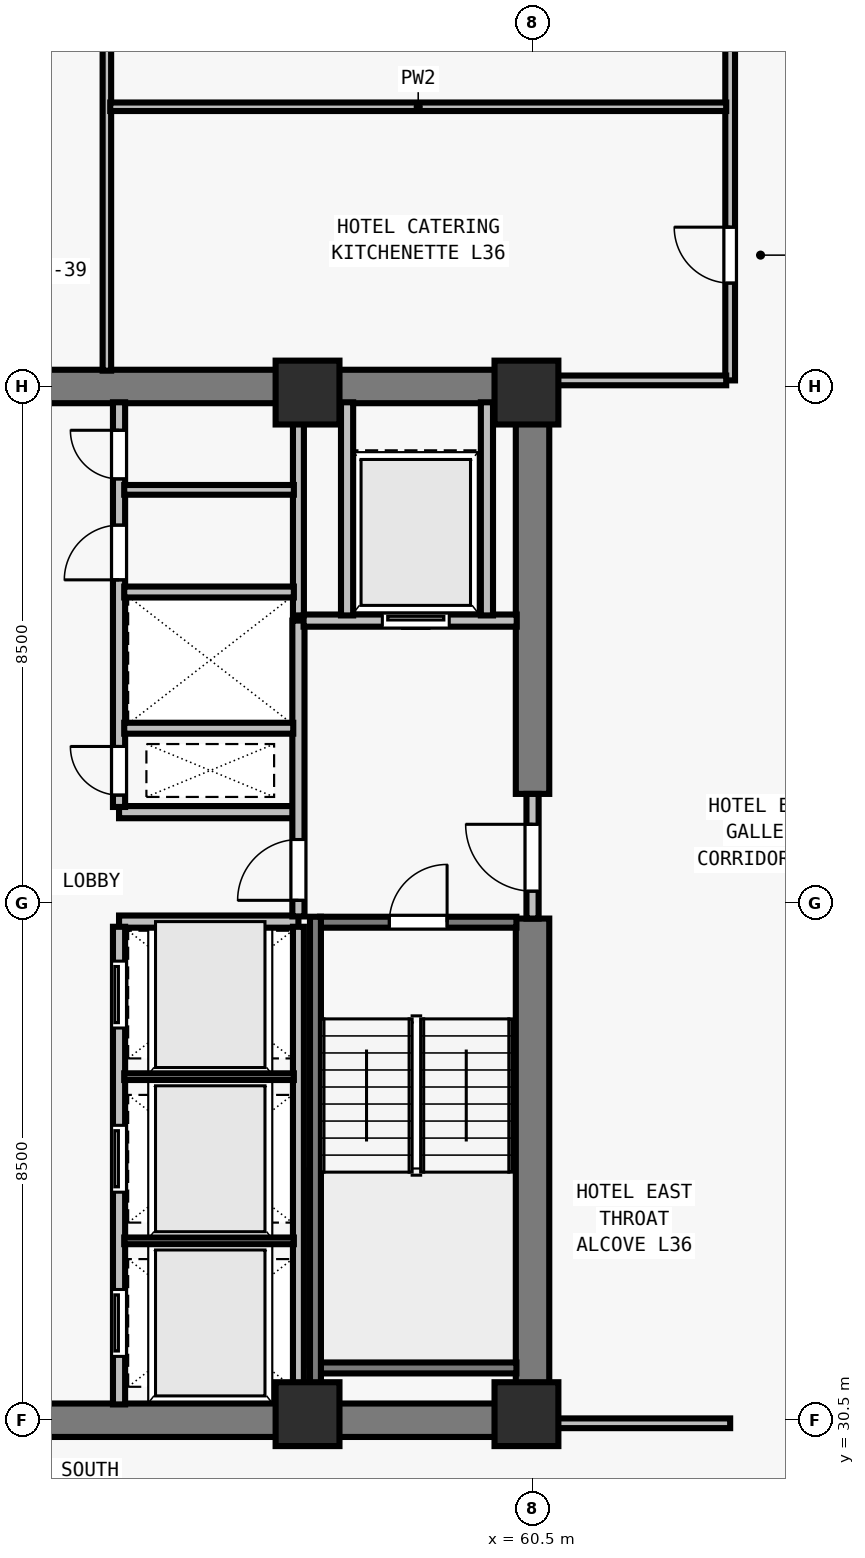
"""IFC4 building model, lengths in metres.
Left out: names, types, materials, properties, quantities, classifications, styles, units other than length and angle.
Written with IfcOpenShell. Run it as: python <this file> out.ifc"""

import sys

from ifc_helpers import new_model, si_unit, direction, frame, frame_2d, origin, origin_2d, place, context, subcontext, project, spatial, rectangle, extrude, element, fill, save


model = new_model("IFC4")
c1 = context("Model", 3, precision=1e-05, world=origin(), true_north=direction((0.0, 1.0)))
c2 = subcontext(c1, "Body", "Model", "MODEL_VIEW")
j1 = project(units=[si_unit("LENGTHUNIT", "METRE"), si_unit("PLANEANGLEUNIT", "RADIAN")], contexts=[c1])
p1 = place(None, origin())
s1 = spatial("IfcSite", under=j1, at=p1, CompositionType="ELEMENT")
p2 = place(p1, origin())
s2 = spatial("IfcBuilding", under=s1, at=p2, CompositionType="ELEMENT")
p3 = place(p2, frame((0.0, 0.0, 134.0)))
s3 = spatial("IfcBuildingStorey", under=s2, at=p3, CompositionType="ELEMENT", Elevation=134.0)
for number, where, z_axis, x_axis in (
    (1, (56.8, 30.6, 0.0), (0.0, 0.0, 1.0), (1.0, 0.0, 0.0)),
    (2, (60.4, 30.6, 0.0), (0.0, 0.0, 1.0), (1.0, 0.0, 0.0)),
    (3, (56.8, 47.4, 0.0), (0.0, 0.0, 1.0), (1.0, 0.0, 0.0)),
    (4, (60.4, 47.4, 0.0), (0.0, 0.0, 1.0), (1.0, 0.0, 0.0)),
):
    element("IfcColumn", number, at=place(p3, frame(where, z_axis=z_axis, x_axis=x_axis)), inside=s3, PredefinedType="COLUMN", context=c2, shape_type="SweptSolid", body=[
        extrude(rectangle(XDim=1.05, YDim=1.05, at=origin_2d()), origin(), (0.0, 0.0, 1.0), 3.5),
    ])
for number, where, z_axis, x_axis in (
    (5, (43.225, 30.5, 0.0), (0.0, 0.0, 1.0), (1.0, 0.0, 0.0)),
    (6, (43.225, 47.5, 0.0), (0.0, 0.0, 1.0), (1.0, 0.0, 0.0)),
):
    element("IfcWall", number, at=place(p3, frame(where, z_axis=z_axis, x_axis=x_axis)), inside=s3, PredefinedType="SHEAR", context=c2, shape_type="SweptSolid", body=[
        extrude(rectangle(XDim=17.55, YDim=0.55, at=frame_2d((8.775, 0.0))), origin(), (0.0, 0.0, 1.0), 3.28),
    ])
p4 = place(p3, frame((60.5, 30.765, 0.0), z_axis=(0.0, 0.0, 1.0), x_axis=(0.0, 1.0, 0.0)))
e7 = element("IfcWall", 7, at=p4, inside=s3, PredefinedType="SHEAR", context=c2, shape_type="SweptSolid", body=[
    extrude(rectangle(XDim=7.985, YDim=0.55, at=frame_2d((3.993, 0.0))), origin(), (0.0, 0.0, 1.0), 3.28),
])
p5 = place(p3, frame((60.5, 40.8, 0.0), z_axis=(0.0, 0.0, 1.0), x_axis=(0.0, 1.0, 0.0)))
e8 = element("IfcWall", 8, at=p5, inside=s3, PredefinedType="SHEAR", context=c2, shape_type="SweptSolid", body=[
    extrude(rectangle(XDim=6.435, YDim=0.55, at=frame_2d((3.218, 0.0))), origin(), (0.0, 0.0, 1.0), 3.28),
])
for number, where, z_axis, x_axis in (
    (9, (53.7, 38.7, 0.0), (0.0, 0.0, 1.0), (1.0, 0.0, 0.0)),
    (10, (53.7, 40.5, 0.0), (0.0, 0.0, 1.0), (1.0, 0.0, 0.0)),
):
    element("IfcWall", number, at=place(p3, frame(where, z_axis=z_axis, x_axis=x_axis)), inside=s3, PredefinedType="SOLIDWALL", context=c2, shape_type="SweptSolid", body=[
        extrude(rectangle(XDim=2.95, YDim=0.2, at=frame_2d((1.475, 0.0))), origin(), (0.0, 0.0, 1.0), 3.28),
    ])
p6 = place(p3, frame((53.7, 30.76, 0.0), z_axis=(0.0, 0.0, 1.0), x_axis=(0.0, 1.0, 0.0)))
e11 = element("IfcWall", 11, at=p6, inside=s3, PredefinedType="SOLIDWALL", context=c2, shape_type="SweptSolid", body=[
    extrude(rectangle(XDim=7.855, YDim=0.2, at=frame_2d((3.927, 0.0))), origin(), (0.0, 0.0, 1.0), 3.28),
])
p7 = place(p6, frame((0.79, 0.0, 0.0)))
e12 = element("IfcOpeningElement", 12, at=p7, cuts=e11, PredefinedType="OPENING", context=c2, shape_type="SweptSolid", body=[
    extrude(rectangle(XDim=1.1, YDim=2.2, at=frame_2d((0.55, 1.1))), frame((0.0, 0.11, 0.0), z_axis=(0.0, -1.0, 0.0), x_axis=(1.0, 0.0, 0.0)), (0.0, 0.0, 1.0), 0.22),
])
p8 = place(p6, frame((3.49, 0.0, 0.0)))
e13 = element("IfcOpeningElement", 13, at=p8, cuts=e11, PredefinedType="OPENING", context=c2, shape_type="SweptSolid", body=[
    extrude(rectangle(XDim=1.1, YDim=2.2, at=frame_2d((0.55, 1.1))), frame((0.0, 0.11, 0.0), z_axis=(0.0, -1.0, 0.0), x_axis=(1.0, 0.0, 0.0)), (0.0, 0.0, 1.0), 0.22),
])
p9 = place(p6, frame((6.19, 0.0, 0.0)))
e14 = element("IfcOpeningElement", 14, at=p9, cuts=e11, PredefinedType="OPENING", context=c2, shape_type="SweptSolid", body=[
    extrude(rectangle(XDim=1.1, YDim=2.2, at=frame_2d((0.55, 1.1))), frame((0.0, 0.11, 0.0), z_axis=(0.0, -1.0, 0.0), x_axis=(1.0, 0.0, 0.0)), (0.0, 0.0, 1.0), 0.22),
])
p10 = place(p3, frame((53.7, 40.585, 0.0), z_axis=(0.0, 0.0, 1.0), x_axis=(0.0, 1.0, 0.0)))
e15 = element("IfcWall", 15, at=p10, inside=s3, PredefinedType="SOLIDWALL", context=c2, shape_type="SweptSolid", body=[
    extrude(rectangle(XDim=6.655, YDim=0.2, at=frame_2d((3.328, 0.0))), origin(), (0.0, 0.0, 1.0), 3.28),
])
p11 = place(p10, frame((0.195, 0.0, 0.0)))
e16 = element("IfcOpeningElement", 16, at=p11, cuts=e15, PredefinedType="OPENING", context=c2, shape_type="SweptSolid", body=[
    extrude(rectangle(XDim=0.8, YDim=2.08, at=frame_2d((0.4, 1.04))), frame((0.0, 0.11, 0.0), z_axis=(0.0, -1.0, 0.0), x_axis=(1.0, 0.0, 0.0)), (0.0, 0.0, 1.0), 0.22),
])
p12 = place(p10, frame((3.735, 0.0, 0.0)))
e17 = element("IfcOpeningElement", 17, at=p12, cuts=e15, PredefinedType="OPENING", context=c2, shape_type="SweptSolid", body=[
    extrude(rectangle(XDim=0.9, YDim=2.12, at=frame_2d((0.45, 1.06))), frame((0.0, 0.11, 0.0), z_axis=(0.0, -1.0, 0.0), x_axis=(1.0, 0.0, 0.0)), (0.0, 0.0, 1.0), 0.22),
])
p13 = place(p10, frame((5.395, 0.0, 0.0)))
e18 = element("IfcOpeningElement", 18, at=p13, cuts=e15, PredefinedType="OPENING", context=c2, shape_type="SweptSolid", body=[
    extrude(rectangle(XDim=0.8, YDim=2.1, at=frame_2d((0.4, 1.05))), frame((0.0, 0.11, 0.0), z_axis=(0.0, -1.0, 0.0), x_axis=(1.0, 0.0, 0.0)), (0.0, 0.0, 1.0), 0.22),
])
p14 = place(p3, frame((60.5, 38.75, 0.0), z_axis=(0.0, 0.0, 1.0), x_axis=(0.0, 1.0, 0.0)))
e19 = element("IfcWall", 19, at=p14, inside=s3, PredefinedType="SOLIDWALL", context=c2, shape_type="SweptSolid", body=[
    extrude(rectangle(XDim=2.05, YDim=0.2, at=frame_2d((1.025, 0.0))), origin(), (0.0, 0.0, 1.0), 3.28),
])
p15 = place(p14, frame((0.45, 0.0, 0.0)))
e20 = element("IfcOpeningElement", 20, at=p15, cuts=e19, PredefinedType="OPENING", context=c2, shape_type="SweptSolid", body=[
    extrude(rectangle(XDim=1.1, YDim=2.15, at=frame_2d((0.55, 1.075))), frame((0.0, 0.11, 0.0), z_axis=(0.0, -1.0, 0.0), x_axis=(1.0, 0.0, 0.0)), (0.0, 0.0, 1.0), 0.22),
])
p16 = place(p3, frame((56.65, 38.785, 0.0), z_axis=(0.0, 0.0, 1.0), x_axis=(0.0, 1.0, 0.0)))
e21 = element("IfcWall", 21, at=p16, inside=s3, PredefinedType="SOLIDWALL", context=c2, shape_type="SweptSolid", body=[
    extrude(rectangle(XDim=4.865, YDim=0.2, at=frame_2d((2.433, 0.0))), origin(), (0.0, 0.0, 1.0), 3.28),
])
p17 = place(p16, frame((0.265, 0.0, 0.0)))
e22 = element("IfcOpeningElement", 22, at=p17, cuts=e21, PredefinedType="OPENING", context=c2, shape_type="SweptSolid", body=[
    extrude(rectangle(XDim=1.0, YDim=2.15, at=frame_2d((0.5, 1.075))), frame((0.0, 0.11, 0.0), z_axis=(0.0, -1.0, 0.0), x_axis=(1.0, 0.0, 0.0)), (0.0, 0.0, 1.0), 0.22),
])
p18 = place(p3, frame((56.735, 43.65, 0.0), z_axis=(0.0, 0.0, 1.0), x_axis=(1.0, 0.0, 0.0)))
e23 = element("IfcWall", 23, at=p18, inside=s3, PredefinedType="SOLIDWALL", context=c2, shape_type="SweptSolid", body=[
    extrude(rectangle(XDim=3.505, YDim=0.2, at=frame_2d((1.752, 0.0))), origin(), (0.0, 0.0, 1.0), 3.28),
])
p19 = place(p18, frame((1.295, 0.0, 0.0)))
e24 = element("IfcOpeningElement", 24, at=p19, cuts=e23, PredefinedType="OPENING", context=c2, shape_type="SweptSolid", body=[
    extrude(rectangle(XDim=1.1, YDim=2.2, at=frame_2d((0.55, 1.1))), frame((0.0, 0.11, 0.0), z_axis=(0.0, -1.0, 0.0), x_axis=(1.0, 0.0, 0.0)), (0.0, 0.0, 1.0), 0.22),
])
for number, where, z_axis, x_axis in (
    (25, (57.45, 43.735, 0.0), (0.0, 0.0, 1.0), (0.0, 1.0, 0.0)),
    (26, (59.75, 43.735, 0.0), (0.0, 0.0, 1.0), (0.0, 1.0, 0.0)),
):
    element("IfcWall", number, at=place(p3, frame(where, z_axis=z_axis, x_axis=x_axis)), inside=s3, PredefinedType="SOLIDWALL", context=c2, shape_type="SweptSolid", body=[
        extrude(rectangle(XDim=3.505, YDim=0.2, at=frame_2d((1.752, 0.0))), origin(), (0.0, 0.0, 1.0), 3.28),
    ])
p20 = place(p3, frame((56.65, 30.76, 0.0), z_axis=(0.0, 0.0, 1.0), x_axis=(0.0, 1.0, 0.0)))
e27 = element("IfcWall", 27, at=p20, inside=s3, PredefinedType="SOLIDWALL", context=c2, shape_type="SweptSolid", body=[
    extrude(rectangle(XDim=7.855, YDim=0.18, at=frame_2d((3.927, 0.0))), origin(), (0.0, 0.0, 1.0), 3.28),
])
for number, where, z_axis, x_axis in (
    (28, (53.785, 33.45, 0.0), (0.0, 0.0, 1.0), (1.0, 0.0, 0.0)),
    (29, (53.785, 36.15, 0.0), (0.0, 0.0, 1.0), (1.0, 0.0, 0.0)),
):
    element("IfcWall", number, at=place(p3, frame(where, z_axis=z_axis, x_axis=x_axis)), inside=s3, PredefinedType="PARTITIONING", context=c2, shape_type="SweptSolid", body=[
        extrude(rectangle(XDim=2.79, YDim=0.11, at=frame_2d((1.395, 0.0))), origin(), (0.0, 0.0, 1.0), 3.28),
    ])
p21 = place(p3, frame((56.65, 43.735, 0.0), z_axis=(0.0, 0.0, 1.0), x_axis=(0.0, 1.0, 0.0)))
e30 = element("IfcWall", 30, at=p21, inside=s3, PredefinedType="SOLIDWALL", context=c2, shape_type="SweptSolid", body=[
    extrude(rectangle(XDim=3.505, YDim=0.18, at=frame_2d((1.752, 0.0))), origin(), (0.0, 0.0, 1.0), 3.28),
])
p22 = place(p3, frame((53.785, 41.88, 0.0), z_axis=(0.0, 0.0, 1.0), x_axis=(1.0, 0.0, 0.0)))
e31 = element("IfcWall", 31, at=p22, inside=s3, PredefinedType="SOLIDWALL", context=c2, shape_type="SweptSolid", body=[
    extrude(rectangle(XDim=2.78, YDim=0.18, at=frame_2d((1.39, 0.0))), origin(), (0.0, 0.0, 1.0), 3.28),
])
p23 = place(p3, frame((53.785, 44.12, 0.0), z_axis=(0.0, 0.0, 1.0), x_axis=(1.0, 0.0, 0.0)))
e32 = element("IfcWall", 32, at=p23, inside=s3, PredefinedType="SOLIDWALL", context=c2, shape_type="SweptSolid", body=[
    extrude(rectangle(XDim=2.79, YDim=0.18, at=frame_2d((1.395, 0.0))), origin(), (0.0, 0.0, 1.0), 3.28),
])
p24 = place(p3, frame((53.785, 45.8, 0.0), z_axis=(0.0, 0.0, 1.0), x_axis=(1.0, 0.0, 0.0)))
e33 = element("IfcWall", 33, at=p24, inside=s3, PredefinedType="PARTITIONING", context=c2, shape_type="SweptSolid", body=[
    extrude(rectangle(XDim=2.79, YDim=0.16, at=frame_2d((1.395, 0.0))), origin(), (0.0, 0.0, 1.0), 3.28),
])
p25 = place(p3, frame((63.75, 47.6, 0.0), z_axis=(0.0, 0.0, 1.0), x_axis=(0.0, 1.0, 0.0)))
e34 = element("IfcWall", 34, at=p25, inside=s3, PredefinedType="PARTITIONING", context=c2, shape_type="SweptSolid", body=[
    extrude(rectangle(XDim=15.075, YDim=0.16, at=frame_2d((7.538, 0.0))), origin(), (0.0, 0.0, 1.0), 2.555),
])
p26 = place(p25, frame((1.6, 0.0, 0.0)))
e35 = element("IfcOpeningElement", 35, at=p26, cuts=e34, PredefinedType="OPENING", context=c2, shape_type="SweptSolid", body=[
    extrude(rectangle(XDim=0.92, YDim=2.12, at=frame_2d((0.46, 1.06))), frame((0.0, 0.09, 0.0), z_axis=(0.0, -1.0, 0.0), x_axis=(1.0, 0.0, 0.0)), (0.0, 0.0, 1.0), 0.18),
])
p27 = place(p25, frame((6.2, 0.0, 0.0)))
e36 = element("IfcOpeningElement", 36, at=p27, cuts=e34, PredefinedType="OPENING", context=c2, shape_type="SweptSolid", body=[
    extrude(rectangle(XDim=0.96, YDim=2.12, at=frame_2d((0.48, 1.06))), frame((0.0, 0.09, 0.0), z_axis=(0.0, -1.0, 0.0), x_axis=(1.0, 0.0, 0.0)), (0.0, 0.0, 1.0), 0.18),
])
p28 = place(p3, frame((60.765, 30.45, 0.0), z_axis=(0.0, 0.0, 1.0), x_axis=(1.0, 0.0, 0.0)))
e37 = element("IfcWall", 37, at=p28, inside=s3, PredefinedType="PARTITIONING", context=c2, shape_type="SweptSolid", body=[
    extrude(rectangle(XDim=2.985, YDim=0.16, at=frame_2d((1.493, 0.0))), origin(), (0.0, 0.0, 1.0), 3.28),
])
p29 = place(p3, frame((60.765, 47.6, 0.0), z_axis=(0.0, 0.0, 1.0), x_axis=(1.0, 0.0, 0.0)))
e38 = element("IfcWall", 38, at=p29, inside=s3, PredefinedType="PARTITIONING", context=c2, shape_type="SweptSolid", body=[
    extrude(rectangle(XDim=2.92, YDim=0.16, at=frame_2d((1.46, 0.0))), origin(), (0.0, 0.0, 1.0), 3.28),
])
p30 = place(p3, frame((53.5, 47.76, 0.0), z_axis=(0.0, 0.0, 1.0), x_axis=(0.0, 1.0, 0.0)))
e39 = element("IfcWall", 39, at=p30, inside=s3, PredefinedType="PARTITIONING", context=c2, shape_type="SweptSolid", body=[
    extrude(rectangle(XDim=14.915, YDim=0.14, at=frame_2d((7.458, 0.0))), origin(), (0.0, 0.0, 1.0), 2.896),
])
p31 = place(p3, frame((53.555, 52.1, 0.0), z_axis=(0.0, 0.0, 1.0), x_axis=(1.0, 0.0, 0.0)))
e40 = element("IfcWall", 40, at=p31, inside=s3, PredefinedType="PARTITIONING", context=c2, shape_type="SweptSolid", body=[
    extrude(rectangle(XDim=10.13, YDim=0.14, at=frame_2d((5.065, 0.0))), origin(), (0.0, 0.0, 1.0), 3.28),
])
p32 = place(p3, frame((57.005, 38.69, 0.0), z_axis=(0.0, 0.0, 1.0), x_axis=(1.0, 0.0, 0.0)))
e41 = element("IfcWall", 41, at=p32, inside=s3, PredefinedType="SOLIDWALL", context=c2, shape_type="SweptSolid", body=[
    extrude(rectangle(XDim=3.23, YDim=0.18, at=frame_2d((1.615, 0.0))), origin(), (0.0, 0.0, 1.0), 3.28),
])
p33 = place(p32, frame((1.14, 0.0, 0.0)))
e42 = element("IfcOpeningElement", 42, at=p33, cuts=e41, PredefinedType="OPENING", context=c2, shape_type="SweptSolid", body=[
    extrude(rectangle(XDim=0.95, YDim=2.15, at=frame_2d((0.475, 1.075))), frame((0.0, 0.1, 0.0), z_axis=(0.0, -1.0, 0.0), x_axis=(1.0, 0.0, 0.0)), (0.0, 0.0, 1.0), 0.2),
])
p34 = place(p3, frame((57.005, 31.36, 0.0), z_axis=(0.0, 0.0, 1.0), x_axis=(1.0, 0.0, 0.0)))
e43 = element("IfcWall", 43, at=p34, inside=s3, PredefinedType="SOLIDWALL", context=c2, shape_type="SweptSolid", body=[
    extrude(rectangle(XDim=3.23, YDim=0.18, at=frame_2d((1.615, 0.0))), origin(), (0.0, 0.0, 1.0), 3.28),
])
p35 = place(p3, frame((56.93, 38.78, 0.0), z_axis=(0.0, 0.0, 1.0), x_axis=(0.0, -1.0, 0.0)))
e44 = element("IfcWall", 44, at=p35, inside=s3, PredefinedType="SOLIDWALL", context=c2, shape_type="SweptSolid", body=[
    extrude(rectangle(XDim=8.017, YDim=0.18, at=frame_2d((4.009, 0.0))), origin(), (0.0, 0.0, 1.0), 3.28),
])
p36 = place(p15, origin())
e45 = element("IfcDoor", 45, at=p36, inside=s3, OperationType="SINGLE_SWING_RIGHT", PredefinedType="DOOR", context=c2, shape_type="SweptSolid", body=[
    extrude(rectangle(XDim=1.1, YDim=2.15, at=frame_2d((0.55, 1.075))), frame((0.0, 0.025, 0.0), z_axis=(0.0, -1.0, 0.0), x_axis=(1.0, 0.0, 0.0)), (0.0, 0.0, 1.0), 0.05),
])
fill(e20, e45)
p37 = place(p17, origin())
e46 = element("IfcDoor", 46, at=p37, inside=s3, OperationType="SINGLE_SWING_LEFT", PredefinedType="DOOR", context=c2, shape_type="SweptSolid", body=[
    extrude(rectangle(XDim=1.0, YDim=2.15, at=frame_2d((0.5, 1.075))), frame((0.0, 0.025, 0.0), z_axis=(0.0, -1.0, 0.0), x_axis=(1.0, 0.0, 0.0)), (0.0, 0.0, 1.0), 0.05),
])
fill(e22, e46)
p38 = place(p19, origin())
e47 = element("IfcDoor", 47, at=p38, inside=s3, OperationType="SLIDING_TO_LEFT", PredefinedType="DOOR", context=c2, shape_type="SweptSolid", body=[
    extrude(rectangle(XDim=1.1, YDim=2.2, at=frame_2d((0.55, 1.1))), frame((0.0, 0.025, 0.0), z_axis=(0.0, -1.0, 0.0), x_axis=(1.0, 0.0, 0.0)), (0.0, 0.0, 1.0), 0.05),
])
fill(e24, e47)
p39 = place(p7, origin())
e48 = element("IfcDoor", 48, at=p39, inside=s3, OperationType="SLIDING_TO_LEFT", PredefinedType="DOOR", context=c2, shape_type="SweptSolid", body=[
    extrude(rectangle(XDim=1.1, YDim=2.2, at=frame_2d((0.55, 1.1))), frame((0.0, 0.025, 0.0), z_axis=(0.0, -1.0, 0.0), x_axis=(1.0, 0.0, 0.0)), (0.0, 0.0, 1.0), 0.05),
])
fill(e12, e48)
p40 = place(p8, origin())
e49 = element("IfcDoor", 49, at=p40, inside=s3, OperationType="SLIDING_TO_LEFT", PredefinedType="DOOR", context=c2, shape_type="SweptSolid", body=[
    extrude(rectangle(XDim=1.1, YDim=2.2, at=frame_2d((0.55, 1.1))), frame((0.0, 0.025, 0.0), z_axis=(0.0, -1.0, 0.0), x_axis=(1.0, 0.0, 0.0)), (0.0, 0.0, 1.0), 0.05),
])
fill(e13, e49)
p41 = place(p9, origin())
e50 = element("IfcDoor", 50, at=p41, inside=s3, OperationType="SLIDING_TO_LEFT", PredefinedType="DOOR", context=c2, shape_type="SweptSolid", body=[
    extrude(rectangle(XDim=1.1, YDim=2.2, at=frame_2d((0.55, 1.1))), frame((0.0, 0.025, 0.0), z_axis=(0.0, -1.0, 0.0), x_axis=(1.0, 0.0, 0.0)), (0.0, 0.0, 1.0), 0.05),
])
fill(e14, e50)
p42 = place(p11, origin())
e51 = element("IfcDoor", 51, at=p42, inside=s3, OperationType="SINGLE_SWING_RIGHT", PredefinedType="DOOR", context=c2, shape_type="SweptSolid", body=[
    extrude(rectangle(XDim=0.8, YDim=2.08, at=frame_2d((0.4, 1.04))), frame((0.0, 0.025, 0.0), z_axis=(0.0, -1.0, 0.0), x_axis=(1.0, 0.0, 0.0)), (0.0, 0.0, 1.0), 0.05),
])
fill(e16, e51)
p43 = place(p12, origin())
e52 = element("IfcDoor", 52, at=p43, inside=s3, OperationType="SINGLE_SWING_LEFT", PredefinedType="DOOR", context=c2, shape_type="SweptSolid", body=[
    extrude(rectangle(XDim=0.9, YDim=2.12, at=frame_2d((0.45, 1.06))), frame((0.0, 0.025, 0.0), z_axis=(0.0, -1.0, 0.0), x_axis=(1.0, 0.0, 0.0)), (0.0, 0.0, 1.0), 0.05),
])
fill(e17, e52)
p44 = place(p13, origin())
e53 = element("IfcDoor", 53, at=p44, inside=s3, OperationType="SINGLE_SWING_RIGHT", PredefinedType="DOOR", context=c2, shape_type="SweptSolid", body=[
    extrude(rectangle(XDim=0.8, YDim=2.1, at=frame_2d((0.4, 1.05))), frame((0.0, 0.025, 0.0), z_axis=(0.0, -1.0, 0.0), x_axis=(1.0, 0.0, 0.0)), (0.0, 0.0, 1.0), 0.05),
])
fill(e18, e53)
p45 = place(p26, origin())
e54 = element("IfcDoor", 54, at=p45, inside=s3, OperationType="SINGLE_SWING_RIGHT", PredefinedType="DOOR", context=c2, shape_type="SweptSolid", body=[
    extrude(rectangle(XDim=0.92, YDim=2.12, at=frame_2d((0.46, 1.06))), frame((0.0, 0.025, 0.0), z_axis=(0.0, -1.0, 0.0), x_axis=(1.0, 0.0, 0.0)), (0.0, 0.0, 1.0), 0.05),
])
fill(e35, e54)
p46 = place(p33, origin())
e55 = element("IfcDoor", 55, at=p46, inside=s3, OperationType="SINGLE_SWING_RIGHT", PredefinedType="DOOR", context=c2, shape_type="SweptSolid", body=[
    extrude(rectangle(XDim=0.95, YDim=2.15, at=frame_2d((0.475, 1.075))), frame((0.0, 0.025, 0.0), z_axis=(0.0, -1.0, 0.0), x_axis=(1.0, 0.0, 0.0)), (0.0, 0.0, 1.0), 0.05),
])
fill(e42, e55)
save(model, sys.argv[1])
